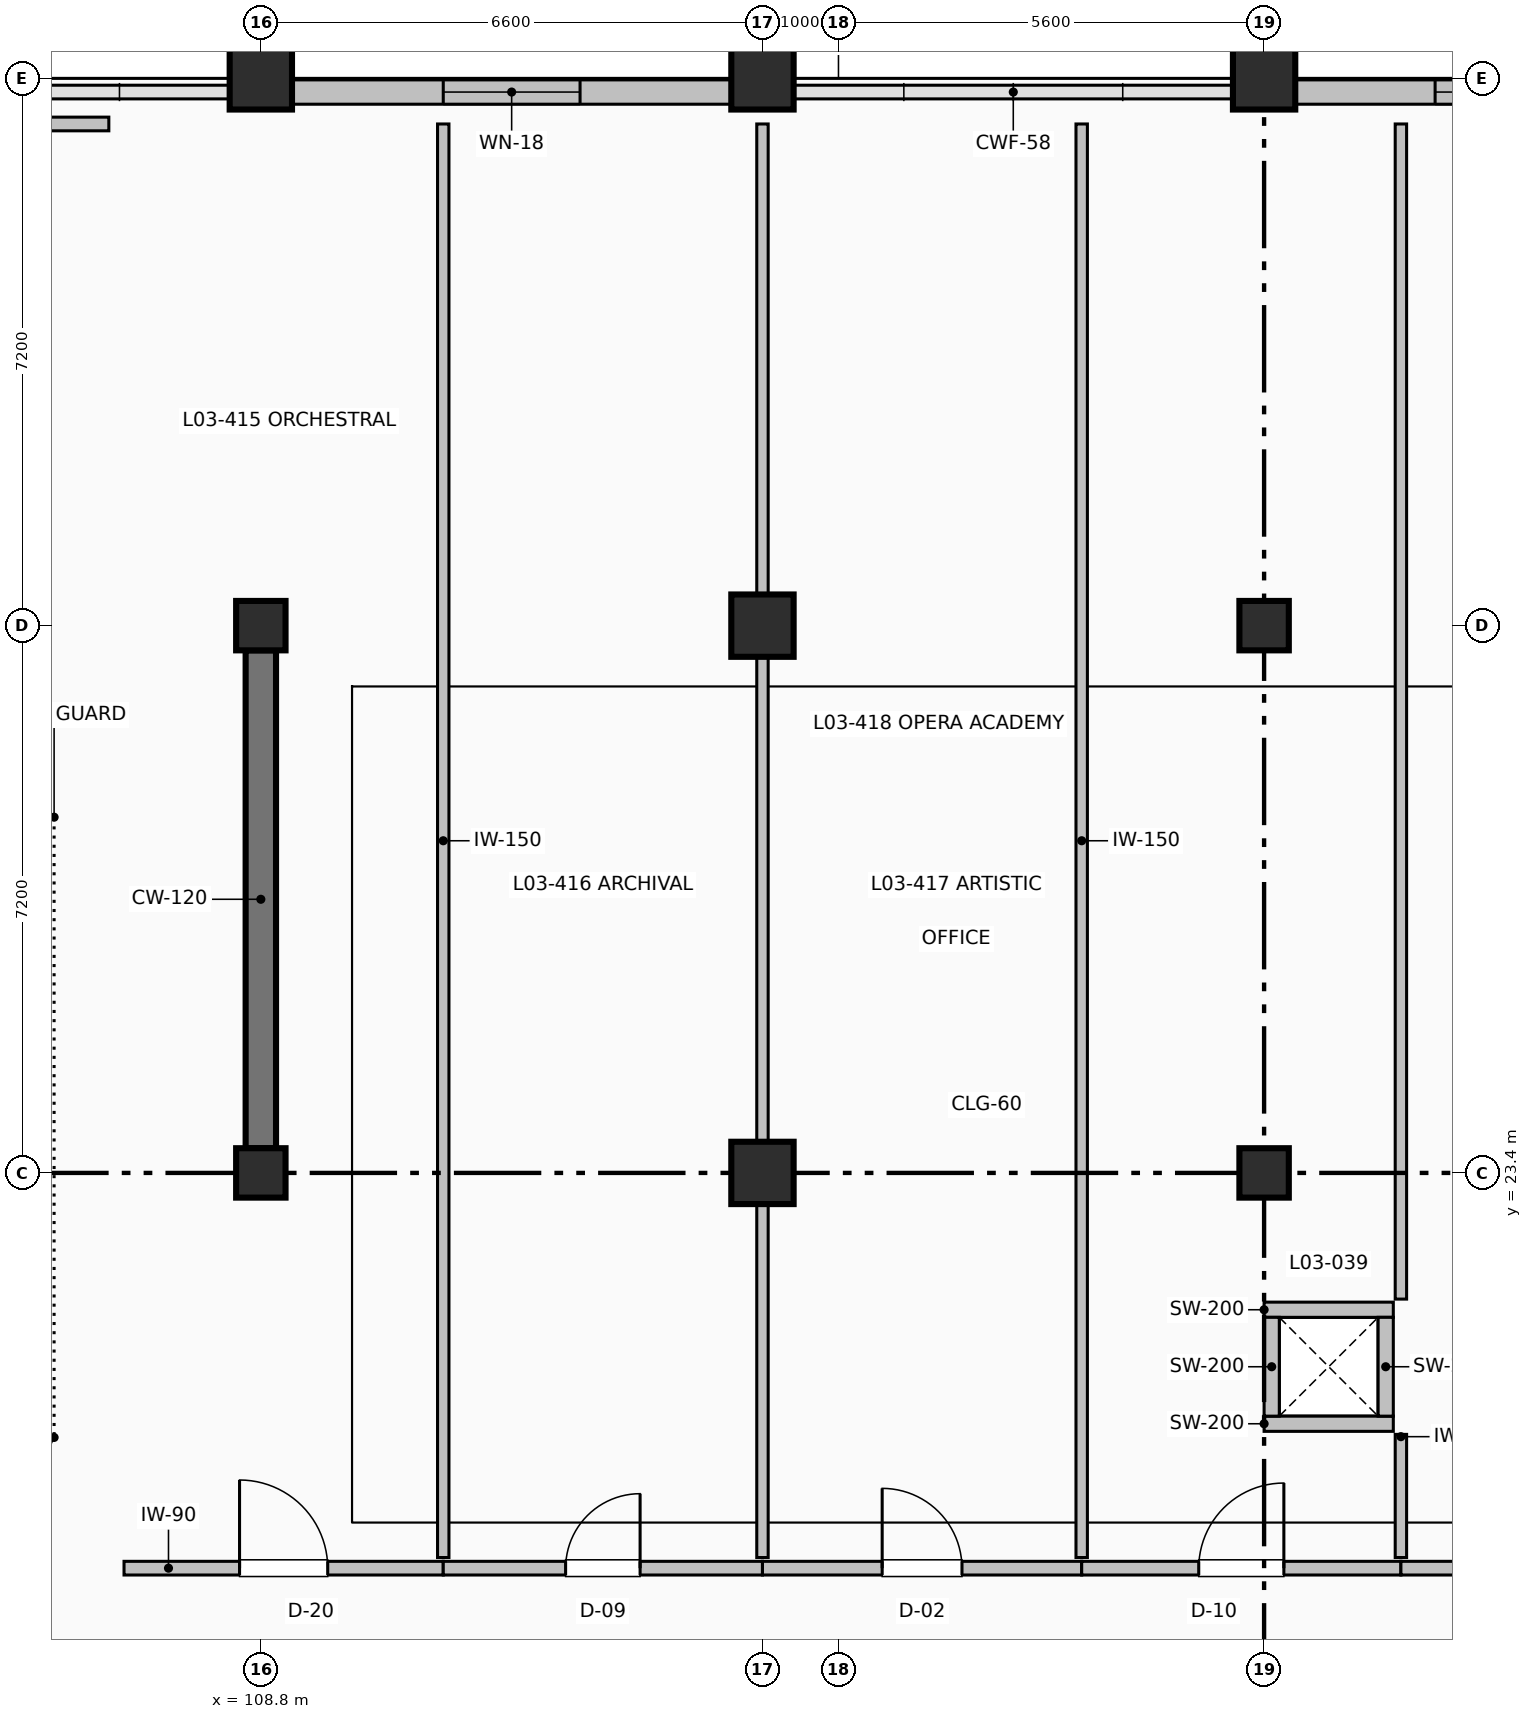
"""IFC4 building model, lengths in metres.
Left out: names, types, materials, properties, quantities, classifications, styles, units other than length and angle.
Written with IfcOpenShell. Run it as: python <this file> out.ifc"""

import sys

from ifc_helpers import new_model, si_unit, direction, frame, frame_2d, origin, origin_2d, place, context, subcontext, project, spatial, rectangle, extrude, element, fill, save


model = new_model("IFC4")
c1 = context("Model", 3, precision=1e-05, world=origin(), true_north=direction((0.0, 1.0)))
c2 = subcontext(c1, "Body", "Model", "MODEL_VIEW")
j1 = project(units=[si_unit("LENGTHUNIT", "METRE"), si_unit("PLANEANGLEUNIT", "RADIAN")], contexts=[c1])
p1 = place(None, origin())
s1 = spatial("IfcSite", under=j1, at=p1, CompositionType="ELEMENT")
p2 = place(p1, origin())
s2 = spatial("IfcBuilding", under=s1, at=p2, CompositionType="ELEMENT")
p3 = place(p2, frame((0.0, 0.0, 15.0)))
s3 = spatial("IfcBuildingStorey", under=s2, at=p3, CompositionType="ELEMENT", Elevation=15.0)
for number, where, z_axis, x_axis in (
    (1, (108.8, 23.4, 0.0), (0.0, 0.0, 1.0), (1.0, 0.0, 0.0)),
    (2, (108.8, 30.6, 0.0), (0.0, 0.0, 1.0), (1.0, 0.0, 0.0)),
):
    element("IfcColumn", number, at=place(p3, frame(where, z_axis=z_axis, x_axis=x_axis)), inside=s3, PredefinedType="COLUMN", context=c2, shape_type="SweptSolid", body=[
        extrude(rectangle(XDim=0.65, YDim=0.65, at=origin_2d()), origin(), (0.0, 0.0, 1.0), 4.5),
    ])
for number, where, z_axis, x_axis in (
    (3, (108.8, 37.8, 0.0), (0.0, 0.0, 1.0), (1.0, 0.0, 0.0)),
    (4, (115.4, 23.4, 0.0), (0.0, 0.0, 1.0), (1.0, 0.0, 0.0)),
    (5, (115.4, 30.6, 0.0), (0.0, 0.0, 1.0), (1.0, 0.0, 0.0)),
    (6, (115.4, 37.8, 0.0), (0.0, 0.0, 1.0), (1.0, 0.0, 0.0)),
):
    element("IfcColumn", number, at=place(p3, frame(where, z_axis=z_axis, x_axis=x_axis)), inside=s3, PredefinedType="COLUMN", context=c2, shape_type="SweptSolid", body=[
        extrude(rectangle(XDim=0.82, YDim=0.82, at=origin_2d()), origin(), (0.0, 0.0, 1.0), 4.5),
    ])
for number, where, z_axis, x_axis in (
    (7, (122.0, 23.4, 0.0), (0.0, 0.0, 1.0), (1.0, 0.0, 0.0)),
    (8, (122.0, 30.6, 0.0), (0.0, 0.0, 1.0), (1.0, 0.0, 0.0)),
):
    element("IfcColumn", number, at=place(p3, frame(where, z_axis=z_axis, x_axis=x_axis)), inside=s3, PredefinedType="COLUMN", context=c2, shape_type="SweptSolid", body=[
        extrude(rectangle(XDim=0.65, YDim=0.65, at=origin_2d()), origin(), (0.0, 0.0, 1.0), 4.5),
    ])
p4 = place(p3, frame((122.0, 37.8, 0.0), z_axis=(0.0, 0.0, 1.0), x_axis=(1.0, 0.0, 0.0)))
e9 = element("IfcColumn", 9, at=p4, inside=s3, PredefinedType="COLUMN", context=c2, shape_type="SweptSolid", body=[
    extrude(rectangle(XDim=0.82, YDim=0.82, at=origin_2d()), origin(), (0.0, 0.0, 1.0), 4.5),
])
p5 = place(p3, frame((108.8, 23.725, 0.0), z_axis=(0.0, 0.0, 1.0), x_axis=(0.0, 1.0, 0.0)))
e10 = element("IfcWall", 10, at=p5, inside=s3, PredefinedType="SHEAR", context=c2, shape_type="SweptSolid", body=[
    extrude(rectangle(XDim=6.55, YDim=0.4, at=frame_2d((3.275, 0.0))), origin(), (0.0, 0.0, 1.0), 4.18),
])
p6 = place(p3, frame((109.21, 37.62, 0.0), z_axis=(0.0, 0.0, 1.0), x_axis=(1.0, 0.0, 0.0)))
e11 = element("IfcWall", 11, at=p6, inside=s3, PredefinedType="SOLIDWALL", context=c2, shape_type="SweptSolid", body=[
    extrude(rectangle(XDim=5.78, YDim=0.32, at=frame_2d((2.89, 0.0))), origin(), (0.0, 0.0, 1.0), 3.522),
])
p7 = place(p6, frame((1.99, 0.0, 1.0)))
e12 = element("IfcOpeningElement", 12, at=p7, cuts=e11, PredefinedType="OPENING", context=c2, shape_type="SweptSolid", body=[
    extrude(rectangle(XDim=1.8, YDim=1.7, at=frame_2d((0.9, 0.85))), frame((0.0, 0.17, 0.0), z_axis=(0.0, -1.0, 0.0), x_axis=(1.0, 0.0, 0.0)), (0.0, 0.0, 1.0), 0.34),
])
p8 = place(p3, frame((122.41, 37.62, 0.0), z_axis=(0.0, 0.0, 1.0), x_axis=(1.0, 0.0, 0.0)))
e13 = element("IfcWall", 13, at=p8, inside=s3, PredefinedType="SOLIDWALL", context=c2, shape_type="SweptSolid", body=[
    extrude(rectangle(XDim=5.78, YDim=0.32, at=frame_2d((2.89, 0.0))), origin(), (0.0, 0.0, 1.0), 3.522),
])
p9 = place(p8, frame((1.84, 0.0, 1.0)))
e14 = element("IfcOpeningElement", 14, at=p9, cuts=e13, PredefinedType="OPENING", context=c2, shape_type="SweptSolid", body=[
    extrude(rectangle(XDim=2.1, YDim=1.7, at=frame_2d((1.05, 0.85))), frame((0.0, 0.17, 0.0), z_axis=(0.0, -1.0, 0.0), x_axis=(1.0, 0.0, 0.0)), (0.0, 0.0, 1.0), 0.34),
])
for number, where, z_axis, x_axis in (
    (15, (122.0, 20.1, 0.0), (0.0, 0.0, 1.0), (1.0, 0.0, 0.0)),
    (16, (123.7, 21.6, 0.0), (0.0, 0.0, 1.0), (-1.0, 0.0, 0.0)),
):
    element("IfcWall", number, at=place(p3, frame(where, z_axis=z_axis, x_axis=x_axis)), inside=s3, PredefinedType="PARTITIONING", context=c2, shape_type="SweptSolid", body=[
        extrude(rectangle(XDim=1.7, YDim=0.2, at=frame_2d((0.85, 0.0))), origin(), (0.0, 0.0, 1.0), 4.2),
    ])
p10 = place(p3, frame((122.1, 20.2, 0.0), z_axis=(0.0, 0.0, 1.0), x_axis=(0.0, 1.0, 0.0)))
e17 = element("IfcWall", 17, at=p10, inside=s3, PredefinedType="PARTITIONING", context=c2, shape_type="SweptSolid", body=[
    extrude(rectangle(XDim=1.3, YDim=0.2, at=frame_2d((0.65, 0.0))), origin(), (0.0, 0.0, 1.0), 3.522),
])
p11 = place(p3, frame((123.6, 21.5, 0.0), z_axis=(0.0, 0.0, 1.0), x_axis=(0.0, -1.0, 0.0)))
e18 = element("IfcWall", 18, at=p11, inside=s3, PredefinedType="PARTITIONING", context=c2, shape_type="SweptSolid", body=[
    extrude(rectangle(XDim=1.3, YDim=0.2, at=frame_2d((0.65, 0.0))), origin(), (0.0, 0.0, 1.0), 4.2),
])
p12 = place(p3, frame((107.0, 18.2, 0.0), z_axis=(0.0, 0.0, 1.0), x_axis=(1.0, 0.0, 0.0)))
e19 = element("IfcWall", 19, at=p12, inside=s3, PredefinedType="PARTITIONING", context=c2, shape_type="SweptSolid", body=[
    extrude(rectangle(XDim=4.2, YDim=0.18, at=frame_2d((2.1, 0.0))), origin(), (0.0, 0.0, 1.0), 4.192),
])
p13 = place(p12, frame((1.52, 0.0, 0.0)))
e20 = element("IfcOpeningElement", 20, at=p13, cuts=e19, PredefinedType="OPENING", context=c2, shape_type="SweptSolid", body=[
    extrude(rectangle(XDim=1.16, YDim=2.1, at=frame_2d((0.58, 1.05))), frame((0.0, 0.1, 0.0), z_axis=(0.0, -1.0, 0.0), x_axis=(1.0, 0.0, 0.0)), (0.0, 0.0, 1.0), 0.2),
])
p14 = place(p3, frame((111.2, 18.34, 0.0), z_axis=(0.0, 0.0, 1.0), x_axis=(0.0, 1.0, 0.0)))
e21 = element("IfcWall", 21, at=p14, inside=s3, PredefinedType="PARTITIONING", context=c2, shape_type="SweptSolid", body=[
    extrude(rectangle(XDim=18.86, YDim=0.15, at=frame_2d((9.43, 0.0))), origin(), (0.0, 0.0, 1.0), 4.192),
])
p15 = place(p3, frame((111.2, 18.2, 0.0), z_axis=(0.0, 0.0, 1.0), x_axis=(1.0, 0.0, 0.0)))
e22 = element("IfcWall", 22, at=p15, inside=s3, PredefinedType="PARTITIONING", context=c2, shape_type="SweptSolid", body=[
    extrude(rectangle(XDim=4.2, YDim=0.18, at=frame_2d((2.1, 0.0))), origin(), (0.0, 0.0, 1.0), 4.192),
])
p16 = place(p15, frame((1.61, 0.0, 0.0)))
e23 = element("IfcOpeningElement", 23, at=p16, cuts=e22, PredefinedType="OPENING", context=c2, shape_type="SweptSolid", body=[
    extrude(rectangle(XDim=0.98, YDim=2.08, at=frame_2d((0.49, 1.04))), frame((0.0, 0.1, 0.0), z_axis=(0.0, -1.0, 0.0), x_axis=(1.0, 0.0, 0.0)), (0.0, 0.0, 1.0), 0.2),
])
p17 = place(p3, frame((115.4, 18.34, 0.0), z_axis=(0.0, 0.0, 1.0), x_axis=(0.0, 1.0, 0.0)))
e24 = element("IfcWall", 24, at=p17, inside=s3, PredefinedType="PARTITIONING", context=c2, shape_type="SweptSolid", body=[
    extrude(rectangle(XDim=4.65, YDim=0.15, at=frame_2d((2.325, 0.0))), origin(), (0.0, 0.0, 1.0), 3.522),
])
p18 = place(p3, frame((115.4, 23.81, 0.0), z_axis=(0.0, 0.0, 1.0), x_axis=(0.0, 1.0, 0.0)))
e25 = element("IfcWall", 25, at=p18, inside=s3, PredefinedType="PARTITIONING", context=c2, shape_type="SweptSolid", body=[
    extrude(rectangle(XDim=6.38, YDim=0.15, at=frame_2d((3.19, 0.0))), origin(), (0.0, 0.0, 1.0), 3.522),
])
p19 = place(p3, frame((115.4, 31.01, 0.0), z_axis=(0.0, 0.0, 1.0), x_axis=(0.0, 1.0, 0.0)))
e26 = element("IfcWall", 26, at=p19, inside=s3, PredefinedType="PARTITIONING", context=c2, shape_type="SweptSolid", body=[
    extrude(rectangle(XDim=6.19, YDim=0.15, at=frame_2d((3.095, 0.0))), origin(), (0.0, 0.0, 1.0), 3.522),
])
p20 = place(p3, frame((115.4, 18.2, 0.0), z_axis=(0.0, 0.0, 1.0), x_axis=(1.0, 0.0, 0.0)))
e27 = element("IfcWall", 27, at=p20, inside=s3, PredefinedType="PARTITIONING", context=c2, shape_type="SweptSolid", body=[
    extrude(rectangle(XDim=4.2, YDim=0.18, at=frame_2d((2.1, 0.0))), origin(), (0.0, 0.0, 1.0), 4.192),
])
p21 = place(p20, frame((1.575, 0.0, 0.0)))
e28 = element("IfcOpeningElement", 28, at=p21, cuts=e27, PredefinedType="OPENING", context=c2, shape_type="SweptSolid", body=[
    extrude(rectangle(XDim=1.05, YDim=2.1, at=frame_2d((0.525, 1.05))), frame((0.0, 0.1, 0.0), z_axis=(0.0, -1.0, 0.0), x_axis=(1.0, 0.0, 0.0)), (0.0, 0.0, 1.0), 0.2),
])
p22 = place(p3, frame((119.6, 18.34, 0.0), z_axis=(0.0, 0.0, 1.0), x_axis=(0.0, 1.0, 0.0)))
e29 = element("IfcWall", 29, at=p22, inside=s3, PredefinedType="PARTITIONING", context=c2, shape_type="SweptSolid", body=[
    extrude(rectangle(XDim=18.86, YDim=0.15, at=frame_2d((9.43, 0.0))), origin(), (0.0, 0.0, 1.0), 4.192),
])
p23 = place(p3, frame((119.6, 18.2, 0.0), z_axis=(0.0, 0.0, 1.0), x_axis=(1.0, 0.0, 0.0)))
e30 = element("IfcWall", 30, at=p23, inside=s3, PredefinedType="PARTITIONING", context=c2, shape_type="SweptSolid", body=[
    extrude(rectangle(XDim=4.2, YDim=0.18, at=frame_2d((2.1, 0.0))), origin(), (0.0, 0.0, 1.0), 4.192),
])
p24 = place(p23, frame((1.54, 0.0, 0.0)))
e31 = element("IfcOpeningElement", 31, at=p24, cuts=e30, PredefinedType="OPENING", context=c2, shape_type="SweptSolid", body=[
    extrude(rectangle(XDim=1.12, YDim=2.12, at=frame_2d((0.56, 1.06))), frame((0.0, 0.1, 0.0), z_axis=(0.0, -1.0, 0.0), x_axis=(1.0, 0.0, 0.0)), (0.0, 0.0, 1.0), 0.2),
])
p25 = place(p3, frame((123.8, 18.34, 0.0), z_axis=(0.0, 0.0, 1.0), x_axis=(0.0, 1.0, 0.0)))
e32 = element("IfcWall", 32, at=p25, inside=s3, PredefinedType="PARTITIONING", context=c2, shape_type="SweptSolid", body=[
    extrude(rectangle(XDim=1.62, YDim=0.15, at=frame_2d((0.81, 0.0))), origin(), (0.0, 0.0, 1.0), 4.192),
])
p26 = place(p3, frame((123.8, 21.74, 0.0), z_axis=(0.0, 0.0, 1.0), x_axis=(0.0, 1.0, 0.0)))
e33 = element("IfcWall", 33, at=p26, inside=s3, PredefinedType="PARTITIONING", context=c2, shape_type="SweptSolid", body=[
    extrude(rectangle(XDim=15.46, YDim=0.15, at=frame_2d((7.73, 0.0))), origin(), (0.0, 0.0, 1.0), 4.192),
])
p27 = place(p3, frame((123.8, 18.2, 0.0), z_axis=(0.0, 0.0, 1.0), x_axis=(1.0, 0.0, 0.0)))
e34 = element("IfcWall", 34, at=p27, inside=s3, PredefinedType="PARTITIONING", context=c2, shape_type="SweptSolid", body=[
    extrude(rectangle(XDim=4.2, YDim=0.18, at=frame_2d((2.1, 0.0))), origin(), (0.0, 0.0, 1.0), 4.192),
])
p28 = place(p27, frame((1.575, 0.0, 0.0)))
e35 = element("IfcOpeningElement", 35, at=p28, cuts=e34, PredefinedType="OPENING", context=c2, shape_type="SweptSolid", body=[
    extrude(rectangle(XDim=1.05, YDim=2.1, at=frame_2d((0.525, 1.05))), frame((0.0, 0.1, 0.0), z_axis=(0.0, -1.0, 0.0), x_axis=(1.0, 0.0, 0.0)), (0.0, 0.0, 1.0), 0.2),
])
p29 = place(p3, frame((89.6, 37.2, 0.0), z_axis=(0.0, 0.0, 1.0), x_axis=(1.0, 0.0, 0.0)))
e36 = element("IfcWall", 36, at=p29, inside=s3, PredefinedType="PARTITIONING", context=c2, shape_type="SweptSolid", body=[
    extrude(rectangle(XDim=17.2, YDim=0.18, at=frame_2d((8.6, 0.0))), origin(), (0.0, 0.0, 1.0), 4.192),
])
p30 = place(p29, frame((3.932, 0.0, 0.0)))
e37 = element("IfcOpeningElement", 37, at=p30, cuts=e36, PredefinedType="OPENING", context=c2, shape_type="SweptSolid", body=[
    extrude(rectangle(XDim=1.28, YDim=2.14, at=frame_2d((0.64, 1.07))), frame((0.0, 0.1, 0.0), z_axis=(0.0, -1.0, 0.0), x_axis=(1.0, 0.0, 0.0)), (0.0, 0.0, 1.0), 0.2),
])
p31 = place(p7, origin())
e38 = element("IfcWindow", 38, at=p31, inside=s3, PartitioningType="SINGLE_PANEL", PredefinedType="WINDOW", context=c2, shape_type="SweptSolid", body=[
    extrude(rectangle(XDim=1.8, YDim=1.7, at=frame_2d((0.9, 0.85))), frame((0.0, 0.03, 0.0), z_axis=(0.0, -1.0, 0.0), x_axis=(1.0, 0.0, 0.0)), (0.0, 0.0, 1.0), 0.06),
])
fill(e12, e38)
p32 = place(p9, origin())
e39 = element("IfcWindow", 39, at=p32, inside=s3, PartitioningType="SINGLE_PANEL", PredefinedType="WINDOW", context=c2, shape_type="SweptSolid", body=[
    extrude(rectangle(XDim=2.1, YDim=1.7, at=frame_2d((1.05, 0.85))), frame((0.0, 0.03, 0.0), z_axis=(0.0, -1.0, 0.0), x_axis=(1.0, 0.0, 0.0)), (0.0, 0.0, 1.0), 0.06),
])
fill(e14, e39)
p33 = place(p13, origin())
e40 = element("IfcDoor", 40, at=p33, inside=s3, OperationType="SINGLE_SWING_LEFT", PredefinedType="DOOR", context=c2, shape_type="SweptSolid", body=[
    extrude(rectangle(XDim=1.16, YDim=2.1, at=frame_2d((0.58, 1.05))), frame((0.0, 0.025, 0.0), z_axis=(0.0, -1.0, 0.0), x_axis=(1.0, 0.0, 0.0)), (0.0, 0.0, 1.0), 0.05),
])
fill(e20, e40)
p34 = place(p16, origin())
e41 = element("IfcDoor", 41, at=p34, inside=s3, OperationType="SINGLE_SWING_RIGHT", PredefinedType="DOOR", context=c2, shape_type="SweptSolid", body=[
    extrude(rectangle(XDim=0.98, YDim=2.08, at=frame_2d((0.49, 1.04))), frame((0.0, 0.025, 0.0), z_axis=(0.0, -1.0, 0.0), x_axis=(1.0, 0.0, 0.0)), (0.0, 0.0, 1.0), 0.05),
])
fill(e23, e41)
p35 = place(p21, origin())
e42 = element("IfcDoor", 42, at=p35, inside=s3, OperationType="SINGLE_SWING_LEFT", PredefinedType="DOOR", context=c2, shape_type="SweptSolid", body=[
    extrude(rectangle(XDim=1.05, YDim=2.1, at=frame_2d((0.525, 1.05))), frame((0.0, 0.025, 0.0), z_axis=(0.0, -1.0, 0.0), x_axis=(1.0, 0.0, 0.0)), (0.0, 0.0, 1.0), 0.05),
])
fill(e28, e42)
p36 = place(p24, origin())
e43 = element("IfcDoor", 43, at=p36, inside=s3, OperationType="SINGLE_SWING_RIGHT", PredefinedType="DOOR", context=c2, shape_type="SweptSolid", body=[
    extrude(rectangle(XDim=1.12, YDim=2.12, at=frame_2d((0.56, 1.06))), frame((0.0, 0.025, 0.0), z_axis=(0.0, -1.0, 0.0), x_axis=(1.0, 0.0, 0.0)), (0.0, 0.0, 1.0), 0.05),
])
fill(e31, e43)
save(model, sys.argv[1])
